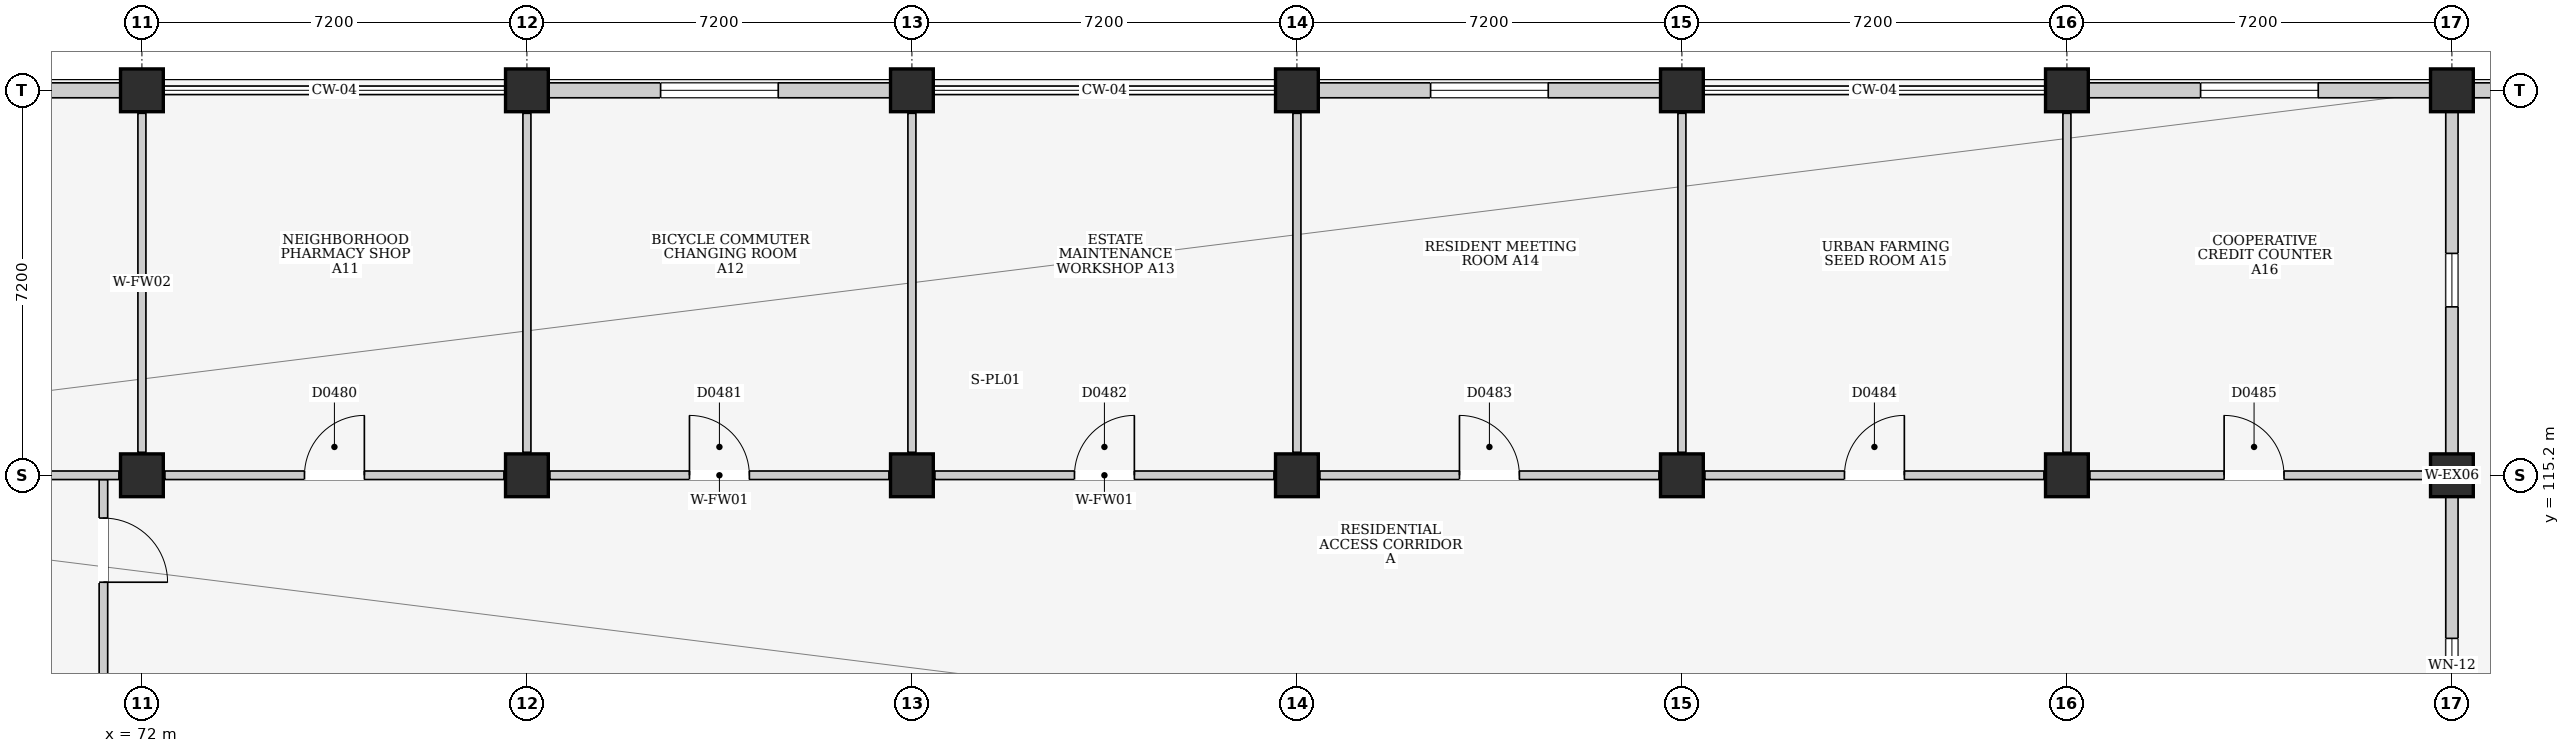
"""IFC4 building model, lengths in metres.
Left out: names, types, materials, properties, quantities, classifications, styles, units other than length and angle.
Written with IfcOpenShell. Run it as: python <this file> out.ifc"""

import sys

from ifc_helpers import new_model, si_unit, direction, frame, frame_2d, origin, origin_2d, place, context, subcontext, project, spatial, rectangle, extrude, element, fill, save


model = new_model("IFC4")
c1 = context("Model", 3, precision=1e-05, world=origin(), true_north=direction((0.0, 1.0)))
c2 = subcontext(c1, "Body", "Model", "MODEL_VIEW")
j1 = project(units=[si_unit("LENGTHUNIT", "METRE"), si_unit("PLANEANGLEUNIT", "RADIAN")], contexts=[c1])
p1 = place(None, origin())
s1 = spatial("IfcSite", under=j1, at=p1, CompositionType="ELEMENT")
p2 = place(p1, origin())
s2 = spatial("IfcBuilding", under=s1, at=p2, CompositionType="ELEMENT")
p3 = place(p2, origin())
s3 = spatial("IfcBuildingStorey", under=s2, at=p3, CompositionType="ELEMENT", Elevation=0.0)
for number, where, z_axis, x_axis in (
    (1, (72.0, 115.2, 0.0), (0.0, 0.0, 1.0), (1.0, 0.0, 0.0)),
    (2, (72.0, 122.4, 0.0), (0.0, 0.0, 1.0), (1.0, 0.0, 0.0)),
    (3, (79.2, 115.2, 0.0), (0.0, 0.0, 1.0), (1.0, 0.0, 0.0)),
    (4, (79.2, 122.4, 0.0), (0.0, 0.0, 1.0), (1.0, 0.0, 0.0)),
    (5, (86.4, 115.2, 0.0), (0.0, 0.0, 1.0), (1.0, 0.0, 0.0)),
    (6, (86.4, 122.4, 0.0), (0.0, 0.0, 1.0), (1.0, 0.0, 0.0)),
    (7, (93.6, 115.2, 0.0), (0.0, 0.0, 1.0), (1.0, 0.0, 0.0)),
    (8, (93.6, 122.4, 0.0), (0.0, 0.0, 1.0), (1.0, 0.0, 0.0)),
    (9, (100.8, 115.2, 0.0), (0.0, 0.0, 1.0), (1.0, 0.0, 0.0)),
    (10, (100.8, 122.4, 0.0), (0.0, 0.0, 1.0), (1.0, 0.0, 0.0)),
    (11, (108.0, 115.2, 0.0), (0.0, 0.0, 1.0), (1.0, 0.0, 0.0)),
    (12, (108.0, 122.4, 0.0), (0.0, 0.0, 1.0), (1.0, 0.0, 0.0)),
    (13, (115.2, 115.2, 0.0), (0.0, 0.0, 1.0), (1.0, 0.0, 0.0)),
    (14, (115.2, 122.4, 0.0), (0.0, 0.0, 1.0), (1.0, 0.0, 0.0)),
):
    element("IfcColumn", number, at=place(p3, frame(where, z_axis=z_axis, x_axis=x_axis)), inside=s3, PredefinedType="COLUMN", context=c2, shape_type="SweptSolid", body=[
        extrude(rectangle(XDim=0.8, YDim=0.8, at=origin_2d()), origin(), (0.0, 0.0, 1.0), 4.5),
    ])
p4 = place(p3, frame((115.5, 122.4, 0.0), z_axis=(0.0, 0.0, 1.0), x_axis=(1.0, 0.0, 0.0)))
e15 = element("IfcWall", 15, at=p4, inside=s3, PredefinedType="ELEMENTEDWALL", context=c2, shape_type="SweptSolid", body=[
    extrude(rectangle(XDim=6.6, YDim=0.28, at=frame_2d((3.3, 0.0))), origin(), (0.0, 0.0, 1.0), 3.22),
])
p5 = place(p4, frame((1.65, 0.0, 0.0)))
e16 = element("IfcOpeningElement", 16, at=p5, cuts=e15, PredefinedType="OPENING", context=c2, shape_type="SweptSolid", body=[
    extrude(rectangle(XDim=3.0, YDim=2.6, at=frame_2d((1.5, 1.3))), frame((0.0, 0.155, 0.0), z_axis=(0.0, -1.0, 0.0), x_axis=(1.0, 0.0, 0.0)), (0.0, 0.0, 1.0), 0.31),
])
p6 = place(p3, frame((65.2, 122.4, 0.0), z_axis=(0.0, 0.0, 1.0), x_axis=(1.0, 0.0, 0.0)))
e17 = element("IfcWall", 17, at=p6, inside=s3, PredefinedType="ELEMENTEDWALL", context=c2, shape_type="SweptSolid", body=[
    extrude(rectangle(XDim=6.4, YDim=0.28, at=frame_2d((3.2, 0.0))), origin(), (0.0, 0.0, 1.0), 3.665),
])
p7 = place(p6, frame((2.1, 0.0, 0.85)))
e18 = element("IfcOpeningElement", 18, at=p7, cuts=e17, PredefinedType="OPENING", context=c2, shape_type="SweptSolid", body=[
    extrude(rectangle(XDim=2.2, YDim=1.8, at=frame_2d((1.1, 0.9))), frame((0.0, 0.155, 0.0), z_axis=(0.0, -1.0, 0.0), x_axis=(1.0, 0.0, 0.0)), (0.0, 0.0, 1.0), 0.31),
])
p8 = place(p3, frame((79.6, 122.4, 0.0), z_axis=(0.0, 0.0, 1.0), x_axis=(1.0, 0.0, 0.0)))
e19 = element("IfcWall", 19, at=p8, inside=s3, PredefinedType="ELEMENTEDWALL", context=c2, shape_type="SweptSolid", body=[
    extrude(rectangle(XDim=6.4, YDim=0.28, at=frame_2d((3.2, 0.0))), origin(), (0.0, 0.0, 1.0), 3.665),
])
p9 = place(p8, frame((2.1, 0.0, 0.85)))
e20 = element("IfcOpeningElement", 20, at=p9, cuts=e19, PredefinedType="OPENING", context=c2, shape_type="SweptSolid", body=[
    extrude(rectangle(XDim=2.2, YDim=1.8, at=frame_2d((1.1, 0.9))), frame((0.0, 0.155, 0.0), z_axis=(0.0, -1.0, 0.0), x_axis=(1.0, 0.0, 0.0)), (0.0, 0.0, 1.0), 0.31),
])
p10 = place(p3, frame((94.0, 122.4, 0.0), z_axis=(0.0, 0.0, 1.0), x_axis=(1.0, 0.0, 0.0)))
e21 = element("IfcWall", 21, at=p10, inside=s3, PredefinedType="ELEMENTEDWALL", context=c2, shape_type="SweptSolid", body=[
    extrude(rectangle(XDim=6.4, YDim=0.28, at=frame_2d((3.2, 0.0))), origin(), (0.0, 0.0, 1.0), 3.665),
])
p11 = place(p10, frame((2.1, 0.0, 0.85)))
e22 = element("IfcOpeningElement", 22, at=p11, cuts=e21, PredefinedType="OPENING", context=c2, shape_type="SweptSolid", body=[
    extrude(rectangle(XDim=2.2, YDim=1.8, at=frame_2d((1.1, 0.9))), frame((0.0, 0.155, 0.0), z_axis=(0.0, -1.0, 0.0), x_axis=(1.0, 0.0, 0.0)), (0.0, 0.0, 1.0), 0.31),
])
p12 = place(p3, frame((108.4, 122.4, 0.0), z_axis=(0.0, 0.0, 1.0), x_axis=(1.0, 0.0, 0.0)))
e23 = element("IfcWall", 23, at=p12, inside=s3, PredefinedType="ELEMENTEDWALL", context=c2, shape_type="SweptSolid", body=[
    extrude(rectangle(XDim=6.4, YDim=0.28, at=frame_2d((3.2, 0.0))), origin(), (0.0, 0.0, 1.0), 3.665),
])
p13 = place(p12, frame((2.1, 0.0, 0.85)))
e24 = element("IfcOpeningElement", 24, at=p13, cuts=e23, PredefinedType="OPENING", context=c2, shape_type="SweptSolid", body=[
    extrude(rectangle(XDim=2.2, YDim=1.8, at=frame_2d((1.1, 0.9))), frame((0.0, 0.155, 0.0), z_axis=(0.0, -1.0, 0.0), x_axis=(1.0, 0.0, 0.0)), (0.0, 0.0, 1.0), 0.31),
])
p14 = place(p3, frame((115.2, 108.4, 0.0), z_axis=(0.0, 0.0, 1.0), x_axis=(0.0, 1.0, 0.0)))
e25 = element("IfcWall", 25, at=p14, inside=s3, PredefinedType="ELEMENTEDWALL", context=c2, shape_type="SweptSolid", body=[
    extrude(rectangle(XDim=6.4, YDim=0.23, at=frame_2d((3.2, 0.0))), origin(), (0.0, 0.0, 1.0), 3.665),
])
p15 = place(p14, frame((2.75, 0.0, 1.1)))
e26 = element("IfcOpeningElement", 26, at=p15, cuts=e25, PredefinedType="OPENING", context=c2, shape_type="SweptSolid", body=[
    extrude(rectangle(XDim=1.0, YDim=0.9, at=frame_2d((0.5, 0.45))), frame((0.0, 0.13, 0.0), z_axis=(0.0, -1.0, 0.0), x_axis=(1.0, 0.0, 0.0)), (0.0, 0.0, 1.0), 0.26),
])
p16 = place(p3, frame((115.2, 115.6, 0.0), z_axis=(0.0, 0.0, 1.0), x_axis=(0.0, 1.0, 0.0)))
e27 = element("IfcWall", 27, at=p16, inside=s3, PredefinedType="ELEMENTEDWALL", context=c2, shape_type="SweptSolid", body=[
    extrude(rectangle(XDim=6.4, YDim=0.23, at=frame_2d((3.2, 0.0))), origin(), (0.0, 0.0, 1.0), 3.665),
])
p17 = place(p16, frame((2.75, 0.0, 1.1)))
e28 = element("IfcOpeningElement", 28, at=p17, cuts=e27, PredefinedType="OPENING", context=c2, shape_type="SweptSolid", body=[
    extrude(rectangle(XDim=1.0, YDim=0.9, at=frame_2d((0.5, 0.45))), frame((0.0, 0.13, 0.0), z_axis=(0.0, -1.0, 0.0), x_axis=(1.0, 0.0, 0.0)), (0.0, 0.0, 1.0), 0.26),
])
p18 = place(p3, frame((71.28, 110.8, 0.0), z_axis=(0.0, 0.0, 1.0), x_axis=(0.0, 1.0, 0.0)))
e29 = element("IfcWall", 29, at=p18, inside=s3, PredefinedType="PARTITIONING", context=c2, shape_type="SweptSolid", body=[
    extrude(rectangle(XDim=4.32, YDim=0.16, at=frame_2d((2.16, 0.0))), origin(), (0.0, 0.0, 1.0), 4.2),
])
p19 = place(p18, frame((2.4, 0.0, 0.0)))
e30 = element("IfcOpeningElement", 30, at=p19, cuts=e29, PredefinedType="OPENING", context=c2, shape_type="SweptSolid", body=[
    extrude(rectangle(XDim=1.2, YDim=2.2, at=frame_2d((0.6, 1.1))), frame((0.0, 0.095, 0.0), z_axis=(0.0, -1.0, 0.0), x_axis=(1.0, 0.0, 0.0)), (0.0, 0.0, 1.0), 0.19),
])
p20 = place(p3, frame((65.23, 115.2, 0.0), z_axis=(0.0, 0.0, 1.0), x_axis=(1.0, 0.0, 0.0)))
e31 = element("IfcWall", 31, at=p20, inside=s3, PredefinedType="PARTITIONING", context=c2, shape_type="SweptSolid", body=[
    extrude(rectangle(XDim=6.34, YDim=0.16, at=frame_2d((3.17, 0.0))), origin(), (0.0, 0.0, 1.0), 3.435),
])
p21 = place(p20, frame((2.61, 0.0, 0.0)))
e32 = element("IfcOpeningElement", 32, at=p21, cuts=e31, PredefinedType="OPENING", context=c2, shape_type="SweptSolid", body=[
    extrude(rectangle(XDim=1.12, YDim=2.2, at=frame_2d((0.56, 1.1))), frame((0.0, 0.095, 0.0), z_axis=(0.0, -1.0, 0.0), x_axis=(1.0, 0.0, 0.0)), (0.0, 0.0, 1.0), 0.19),
])
p22 = place(p3, frame((72.0, 115.63, 0.0), z_axis=(0.0, 0.0, 1.0), x_axis=(0.0, 1.0, 0.0)))
e33 = element("IfcWall", 33, at=p22, inside=s3, PredefinedType="PARTITIONING", context=c2, shape_type="SweptSolid", body=[
    extrude(rectangle(XDim=6.34, YDim=0.15, at=frame_2d((3.17, 0.0))), origin(), (0.0, 0.0, 1.0), 3.435),
])
p23 = place(p3, frame((72.43, 115.2, 0.0), z_axis=(0.0, 0.0, 1.0), x_axis=(1.0, 0.0, 0.0)))
e34 = element("IfcWall", 34, at=p23, inside=s3, PredefinedType="PARTITIONING", context=c2, shape_type="SweptSolid", body=[
    extrude(rectangle(XDim=6.34, YDim=0.16, at=frame_2d((3.17, 0.0))), origin(), (0.0, 0.0, 1.0), 3.435),
])
p24 = place(p23, frame((2.61, 0.0, 0.0)))
e35 = element("IfcOpeningElement", 35, at=p24, cuts=e34, PredefinedType="OPENING", context=c2, shape_type="SweptSolid", body=[
    extrude(rectangle(XDim=1.12, YDim=2.2, at=frame_2d((0.56, 1.1))), frame((0.0, 0.095, 0.0), z_axis=(0.0, -1.0, 0.0), x_axis=(1.0, 0.0, 0.0)), (0.0, 0.0, 1.0), 0.19),
])
p25 = place(p3, frame((79.2, 115.63, 0.0), z_axis=(0.0, 0.0, 1.0), x_axis=(0.0, 1.0, 0.0)))
e36 = element("IfcWall", 36, at=p25, inside=s3, PredefinedType="PARTITIONING", context=c2, shape_type="SweptSolid", body=[
    extrude(rectangle(XDim=6.34, YDim=0.15, at=frame_2d((3.17, 0.0))), origin(), (0.0, 0.0, 1.0), 3.435),
])
p26 = place(p3, frame((79.63, 115.2, 0.0), z_axis=(0.0, 0.0, 1.0), x_axis=(1.0, 0.0, 0.0)))
e37 = element("IfcWall", 37, at=p26, inside=s3, PredefinedType="PARTITIONING", context=c2, shape_type="SweptSolid", body=[
    extrude(rectangle(XDim=6.34, YDim=0.16, at=frame_2d((3.17, 0.0))), origin(), (0.0, 0.0, 1.0), 3.435),
])
p27 = place(p26, frame((2.61, 0.0, 0.0)))
e38 = element("IfcOpeningElement", 38, at=p27, cuts=e37, PredefinedType="OPENING", context=c2, shape_type="SweptSolid", body=[
    extrude(rectangle(XDim=1.12, YDim=2.2, at=frame_2d((0.56, 1.1))), frame((0.0, 0.095, 0.0), z_axis=(0.0, -1.0, 0.0), x_axis=(1.0, 0.0, 0.0)), (0.0, 0.0, 1.0), 0.19),
])
p28 = place(p3, frame((86.4, 115.63, 0.0), z_axis=(0.0, 0.0, 1.0), x_axis=(0.0, 1.0, 0.0)))
e39 = element("IfcWall", 39, at=p28, inside=s3, PredefinedType="PARTITIONING", context=c2, shape_type="SweptSolid", body=[
    extrude(rectangle(XDim=6.34, YDim=0.15, at=frame_2d((3.17, 0.0))), origin(), (0.0, 0.0, 1.0), 3.435),
])
p29 = place(p3, frame((86.83, 115.2, 0.0), z_axis=(0.0, 0.0, 1.0), x_axis=(1.0, 0.0, 0.0)))
e40 = element("IfcWall", 40, at=p29, inside=s3, PredefinedType="PARTITIONING", context=c2, shape_type="SweptSolid", body=[
    extrude(rectangle(XDim=6.34, YDim=0.16, at=frame_2d((3.17, 0.0))), origin(), (0.0, 0.0, 1.0), 3.435),
])
p30 = place(p29, frame((2.61, 0.0, 0.0)))
e41 = element("IfcOpeningElement", 41, at=p30, cuts=e40, PredefinedType="OPENING", context=c2, shape_type="SweptSolid", body=[
    extrude(rectangle(XDim=1.12, YDim=2.2, at=frame_2d((0.56, 1.1))), frame((0.0, 0.095, 0.0), z_axis=(0.0, -1.0, 0.0), x_axis=(1.0, 0.0, 0.0)), (0.0, 0.0, 1.0), 0.19),
])
p31 = place(p3, frame((93.6, 115.63, 0.0), z_axis=(0.0, 0.0, 1.0), x_axis=(0.0, 1.0, 0.0)))
e42 = element("IfcWall", 42, at=p31, inside=s3, PredefinedType="PARTITIONING", context=c2, shape_type="SweptSolid", body=[
    extrude(rectangle(XDim=6.34, YDim=0.15, at=frame_2d((3.17, 0.0))), origin(), (0.0, 0.0, 1.0), 3.435),
])
p32 = place(p3, frame((94.03, 115.2, 0.0), z_axis=(0.0, 0.0, 1.0), x_axis=(1.0, 0.0, 0.0)))
e43 = element("IfcWall", 43, at=p32, inside=s3, PredefinedType="PARTITIONING", context=c2, shape_type="SweptSolid", body=[
    extrude(rectangle(XDim=6.34, YDim=0.16, at=frame_2d((3.17, 0.0))), origin(), (0.0, 0.0, 1.0), 3.435),
])
p33 = place(p32, frame((2.61, 0.0, 0.0)))
e44 = element("IfcOpeningElement", 44, at=p33, cuts=e43, PredefinedType="OPENING", context=c2, shape_type="SweptSolid", body=[
    extrude(rectangle(XDim=1.12, YDim=2.2, at=frame_2d((0.56, 1.1))), frame((0.0, 0.095, 0.0), z_axis=(0.0, -1.0, 0.0), x_axis=(1.0, 0.0, 0.0)), (0.0, 0.0, 1.0), 0.19),
])
p34 = place(p3, frame((100.8, 115.63, 0.0), z_axis=(0.0, 0.0, 1.0), x_axis=(0.0, 1.0, 0.0)))
e45 = element("IfcWall", 45, at=p34, inside=s3, PredefinedType="PARTITIONING", context=c2, shape_type="SweptSolid", body=[
    extrude(rectangle(XDim=6.34, YDim=0.15, at=frame_2d((3.17, 0.0))), origin(), (0.0, 0.0, 1.0), 3.435),
])
p35 = place(p3, frame((101.23, 115.2, 0.0), z_axis=(0.0, 0.0, 1.0), x_axis=(1.0, 0.0, 0.0)))
e46 = element("IfcWall", 46, at=p35, inside=s3, PredefinedType="PARTITIONING", context=c2, shape_type="SweptSolid", body=[
    extrude(rectangle(XDim=6.34, YDim=0.16, at=frame_2d((3.17, 0.0))), origin(), (0.0, 0.0, 1.0), 3.435),
])
p36 = place(p35, frame((2.61, 0.0, 0.0)))
e47 = element("IfcOpeningElement", 47, at=p36, cuts=e46, PredefinedType="OPENING", context=c2, shape_type="SweptSolid", body=[
    extrude(rectangle(XDim=1.12, YDim=2.2, at=frame_2d((0.56, 1.1))), frame((0.0, 0.095, 0.0), z_axis=(0.0, -1.0, 0.0), x_axis=(1.0, 0.0, 0.0)), (0.0, 0.0, 1.0), 0.19),
])
p37 = place(p3, frame((108.0, 115.63, 0.0), z_axis=(0.0, 0.0, 1.0), x_axis=(0.0, 1.0, 0.0)))
e48 = element("IfcWall", 48, at=p37, inside=s3, PredefinedType="PARTITIONING", context=c2, shape_type="SweptSolid", body=[
    extrude(rectangle(XDim=6.34, YDim=0.15, at=frame_2d((3.17, 0.0))), origin(), (0.0, 0.0, 1.0), 3.435),
])
p38 = place(p3, frame((108.43, 115.2, 0.0), z_axis=(0.0, 0.0, 1.0), x_axis=(1.0, 0.0, 0.0)))
e49 = element("IfcWall", 49, at=p38, inside=s3, PredefinedType="PARTITIONING", context=c2, shape_type="SweptSolid", body=[
    extrude(rectangle(XDim=6.34, YDim=0.16, at=frame_2d((3.17, 0.0))), origin(), (0.0, 0.0, 1.0), 3.435),
])
p39 = place(p38, frame((2.51, 0.0, 0.0)))
e50 = element("IfcOpeningElement", 50, at=p39, cuts=e49, PredefinedType="OPENING", context=c2, shape_type="SweptSolid", body=[
    extrude(rectangle(XDim=1.12, YDim=2.2, at=frame_2d((0.56, 1.1))), frame((0.0, 0.095, 0.0), z_axis=(0.0, -1.0, 0.0), x_axis=(1.0, 0.0, 0.0)), (0.0, 0.0, 1.0), 0.19),
])
p40 = place(p9, origin())
e51 = element("IfcWindow", 51, at=p40, inside=s3, PartitioningType="TRIPLE_PANEL_VERTICAL", PredefinedType="WINDOW", context=c2, shape_type="SweptSolid", body=[
    extrude(rectangle(XDim=2.2, YDim=1.8, at=frame_2d((1.1, 0.9))), frame((0.0, 0.03, 0.0), z_axis=(0.0, -1.0, 0.0), x_axis=(1.0, 0.0, 0.0)), (0.0, 0.0, 1.0), 0.06),
])
fill(e20, e51)
p41 = place(p11, origin())
e52 = element("IfcWindow", 52, at=p41, inside=s3, PartitioningType="TRIPLE_PANEL_VERTICAL", PredefinedType="WINDOW", context=c2, shape_type="SweptSolid", body=[
    extrude(rectangle(XDim=2.2, YDim=1.8, at=frame_2d((1.1, 0.9))), frame((0.0, 0.03, 0.0), z_axis=(0.0, -1.0, 0.0), x_axis=(1.0, 0.0, 0.0)), (0.0, 0.0, 1.0), 0.06),
])
fill(e22, e52)
p42 = place(p13, origin())
e53 = element("IfcWindow", 53, at=p42, inside=s3, PartitioningType="TRIPLE_PANEL_VERTICAL", PredefinedType="WINDOW", context=c2, shape_type="SweptSolid", body=[
    extrude(rectangle(XDim=2.2, YDim=1.8, at=frame_2d((1.1, 0.9))), frame((0.0, 0.03, 0.0), z_axis=(0.0, -1.0, 0.0), x_axis=(1.0, 0.0, 0.0)), (0.0, 0.0, 1.0), 0.06),
])
fill(e24, e53)
p43 = place(p15, origin())
e54 = element("IfcWindow", 54, at=p43, inside=s3, PartitioningType="SINGLE_PANEL", PredefinedType="WINDOW", context=c2, shape_type="SweptSolid", body=[
    extrude(rectangle(XDim=1.0, YDim=0.9, at=frame_2d((0.5, 0.45))), frame((0.0, 0.03, 0.0), z_axis=(0.0, -1.0, 0.0), x_axis=(1.0, 0.0, 0.0)), (0.0, 0.0, 1.0), 0.06),
])
fill(e26, e54)
p44 = place(p17, origin())
e55 = element("IfcWindow", 55, at=p44, inside=s3, PartitioningType="SINGLE_PANEL", PredefinedType="WINDOW", context=c2, shape_type="SweptSolid", body=[
    extrude(rectangle(XDim=1.0, YDim=0.9, at=frame_2d((0.5, 0.45))), frame((0.0, 0.03, 0.0), z_axis=(0.0, -1.0, 0.0), x_axis=(1.0, 0.0, 0.0)), (0.0, 0.0, 1.0), 0.06),
])
fill(e28, e55)
p45 = place(p19, frame((1.2, 0.0, 0.0), z_axis=(0.0, 0.0, 1.0), x_axis=(-1.0, 0.0, 0.0)))
e56 = element("IfcDoor", 56, at=p45, inside=s3, OperationType="SINGLE_SWING_RIGHT", PredefinedType="DOOR", context=c2, shape_type="SweptSolid", body=[
    extrude(rectangle(XDim=1.2, YDim=2.2, at=frame_2d((0.6, 1.1))), frame((0.0, 0.025, 0.0), z_axis=(0.0, -1.0, 0.0), x_axis=(1.0, 0.0, 0.0)), (0.0, 0.0, 1.0), 0.05),
])
fill(e30, e56)
p46 = place(p24, origin())
e57 = element("IfcDoor", 57, at=p46, inside=s3, OperationType="SINGLE_SWING_RIGHT", PredefinedType="DOOR", context=c2, shape_type="SweptSolid", body=[
    extrude(rectangle(XDim=1.12, YDim=2.2, at=frame_2d((0.56, 1.1))), frame((0.0, 0.025, 0.0), z_axis=(0.0, -1.0, 0.0), x_axis=(1.0, 0.0, 0.0)), (0.0, 0.0, 1.0), 0.05),
])
fill(e35, e57)
p47 = place(p27, origin())
e58 = element("IfcDoor", 58, at=p47, inside=s3, OperationType="SINGLE_SWING_LEFT", PredefinedType="DOOR", context=c2, shape_type="SweptSolid", body=[
    extrude(rectangle(XDim=1.12, YDim=2.2, at=frame_2d((0.56, 1.1))), frame((0.0, 0.025, 0.0), z_axis=(0.0, -1.0, 0.0), x_axis=(1.0, 0.0, 0.0)), (0.0, 0.0, 1.0), 0.05),
])
fill(e38, e58)
p48 = place(p30, origin())
e59 = element("IfcDoor", 59, at=p48, inside=s3, OperationType="SINGLE_SWING_RIGHT", PredefinedType="DOOR", context=c2, shape_type="SweptSolid", body=[
    extrude(rectangle(XDim=1.12, YDim=2.2, at=frame_2d((0.56, 1.1))), frame((0.0, 0.025, 0.0), z_axis=(0.0, -1.0, 0.0), x_axis=(1.0, 0.0, 0.0)), (0.0, 0.0, 1.0), 0.05),
])
fill(e41, e59)
p49 = place(p33, origin())
e60 = element("IfcDoor", 60, at=p49, inside=s3, OperationType="SINGLE_SWING_LEFT", PredefinedType="DOOR", context=c2, shape_type="SweptSolid", body=[
    extrude(rectangle(XDim=1.12, YDim=2.2, at=frame_2d((0.56, 1.1))), frame((0.0, 0.025, 0.0), z_axis=(0.0, -1.0, 0.0), x_axis=(1.0, 0.0, 0.0)), (0.0, 0.0, 1.0), 0.05),
])
fill(e44, e60)
p50 = place(p36, origin())
e61 = element("IfcDoor", 61, at=p50, inside=s3, OperationType="SINGLE_SWING_RIGHT", PredefinedType="DOOR", context=c2, shape_type="SweptSolid", body=[
    extrude(rectangle(XDim=1.12, YDim=2.2, at=frame_2d((0.56, 1.1))), frame((0.0, 0.025, 0.0), z_axis=(0.0, -1.0, 0.0), x_axis=(1.0, 0.0, 0.0)), (0.0, 0.0, 1.0), 0.05),
])
fill(e47, e61)
p51 = place(p39, origin())
e62 = element("IfcDoor", 62, at=p51, inside=s3, OperationType="SINGLE_SWING_LEFT", PredefinedType="DOOR", context=c2, shape_type="SweptSolid", body=[
    extrude(rectangle(XDim=1.12, YDim=2.2, at=frame_2d((0.56, 1.1))), frame((0.0, 0.025, 0.0), z_axis=(0.0, -1.0, 0.0), x_axis=(1.0, 0.0, 0.0)), (0.0, 0.0, 1.0), 0.05),
])
fill(e50, e62)
save(model, sys.argv[1])
